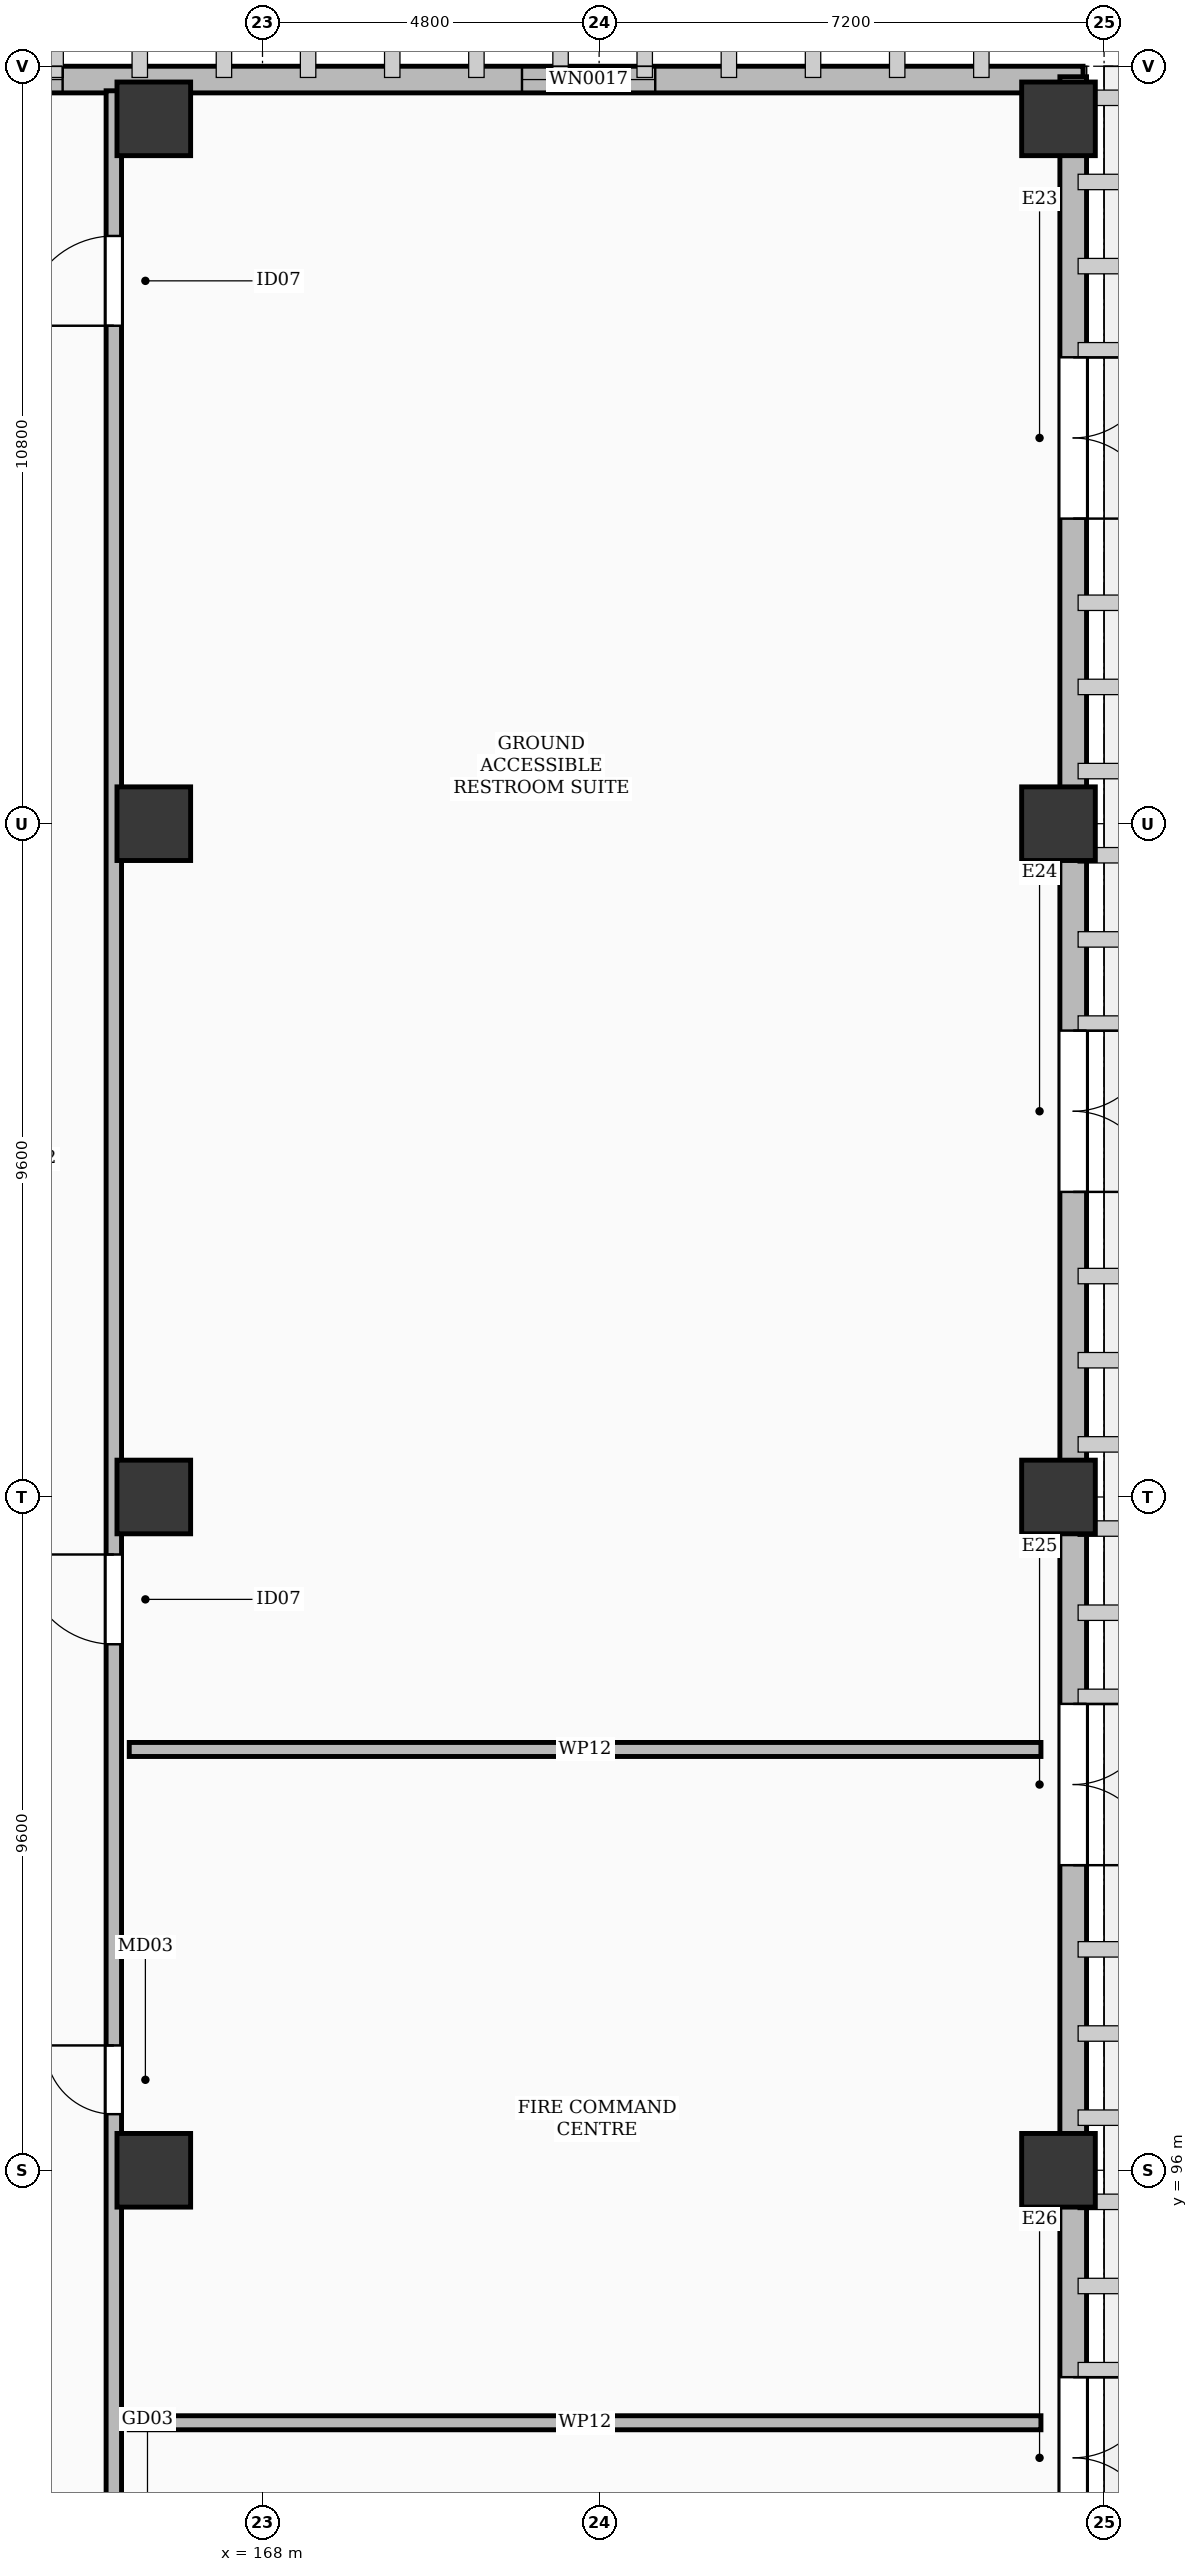
"""IFC4 building model, lengths in metres.
Left out: names, types, materials, properties, quantities, classifications, styles, units other than length and angle.
Written with IfcOpenShell. Run it as: python <this file> out.ifc"""

import sys

from ifc_helpers import new_model, si_unit, direction, frame, frame_2d, origin, origin_2d, place, context, subcontext, project, spatial, rectangle, extrude, element, fill, save


model = new_model("IFC4")
c1 = context("Model", 3, precision=1e-05, world=origin(), true_north=direction((0.0, 1.0)))
c2 = subcontext(c1, "Body", "Model", "MODEL_VIEW")
j1 = project(units=[si_unit("LENGTHUNIT", "METRE"), si_unit("PLANEANGLEUNIT", "RADIAN")], contexts=[c1])
p1 = place(None, origin())
s1 = spatial("IfcSite", under=j1, at=p1, CompositionType="ELEMENT")
p2 = place(p1, origin())
s2 = spatial("IfcBuilding", under=s1, at=p2, CompositionType="ELEMENT")
p3 = place(p2, origin())
s3 = spatial("IfcBuildingStorey", under=s2, at=p3, CompositionType="ELEMENT", Elevation=0.0)
for number, where, z_axis, x_axis in (
    (1, (166.45, 96.0, 0.0), (0.0, 0.0, 1.0), (1.0, 0.0, 0.0)),
    (2, (166.45, 105.6, 0.0), (0.0, 0.0, 1.0), (1.0, 0.0, 0.0)),
    (3, (166.45, 115.2, 0.0), (0.0, 0.0, 1.0), (1.0, 0.0, 0.0)),
    (4, (166.45, 125.25, 0.0), (0.0, 0.0, 1.0), (1.0, 0.0, 0.0)),
    (5, (179.35, 96.0, 0.0), (0.0, 0.0, 1.0), (1.0, 0.0, 0.0)),
    (6, (179.35, 105.6, 0.0), (0.0, 0.0, 1.0), (1.0, 0.0, 0.0)),
    (7, (179.35, 115.2, 0.0), (0.0, 0.0, 1.0), (1.0, 0.0, 0.0)),
    (8, (179.35, 125.25, 0.0), (0.0, 0.0, 1.0), (1.0, 0.0, 0.0)),
):
    element("IfcColumn", number, at=place(p3, frame(where, z_axis=z_axis, x_axis=x_axis)), inside=s3, PredefinedType="COLUMN", context=c2, shape_type="SweptSolid", body=[
        extrude(rectangle(XDim=1.05, YDim=1.05, at=origin_2d()), origin(), (0.0, 0.0, 1.0), 6.0),
    ])
p4 = place(p3, frame((148.9, 125.81, 0.0), z_axis=(0.0, 0.0, 1.0), x_axis=(1.0, 0.0, 0.0)))
e9 = element("IfcWall", 9, at=p4, inside=s3, PredefinedType="SOLIDWALL", context=c2, shape_type="SweptSolid", body=[
    extrude(rectangle(XDim=30.8, YDim=0.38, at=frame_2d((15.4, 0.0))), origin(), (0.0, 0.0, 1.0), 5.7),
])
p5 = place(p4, frame((4.2, 0.0, 0.85)))
e10 = element("IfcOpeningElement", 10, at=p5, cuts=e9, PredefinedType="OPENING", context=c2, shape_type="SweptSolid", body=[
    extrude(rectangle(XDim=1.9, YDim=2.9, at=frame_2d((0.95, 1.45))), frame((0.0, 0.202, 0.0), z_axis=(0.0, -1.0, 0.0), x_axis=(1.0, 0.0, 0.0)), (0.0, 0.0, 1.0), 0.404),
])
p6 = place(p4, frame((14.35, 0.0, 0.85)))
e11 = element("IfcOpeningElement", 11, at=p6, cuts=e9, PredefinedType="OPENING", context=c2, shape_type="SweptSolid", body=[
    extrude(rectangle(XDim=1.9, YDim=2.9, at=frame_2d((0.95, 1.45))), frame((0.0, 0.202, 0.0), z_axis=(0.0, -1.0, 0.0), x_axis=(1.0, 0.0, 0.0)), (0.0, 0.0, 1.0), 0.404),
])
p7 = place(p4, frame((22.8, 0.0, 0.85)))
e12 = element("IfcOpeningElement", 12, at=p7, cuts=e9, PredefinedType="OPENING", context=c2, shape_type="SweptSolid", body=[
    extrude(rectangle(XDim=1.9, YDim=2.9, at=frame_2d((0.95, 1.45))), frame((0.0, 0.202, 0.0), z_axis=(0.0, -1.0, 0.0), x_axis=(1.0, 0.0, 0.0)), (0.0, 0.0, 1.0), 0.404),
])
p8 = place(p3, frame((179.56, 125.85, 0.0), z_axis=(0.0, 0.0, 1.0), x_axis=(0.0, -1.0, 0.0)))
e13 = element("IfcWall", 13, at=p8, inside=s3, PredefinedType="SOLIDWALL", context=c2, shape_type="SweptSolid", body=[
    extrude(rectangle(XDim=125.7, YDim=0.38, at=frame_2d((62.85, 0.0))), origin(), (0.0, 0.0, 1.0), 4.692),
])
p9 = place(p8, frame((4.0, 0.0, 0.0)))
e14 = element("IfcOpeningElement", 14, at=p9, cuts=e13, PredefinedType="OPENING", context=c2, shape_type="SweptSolid", body=[
    extrude(rectangle(XDim=2.3, YDim=2.4, at=frame_2d((1.15, 1.2))), frame((0.0, 0.202, 0.0), z_axis=(0.0, -1.0, 0.0), x_axis=(1.0, 0.0, 0.0)), (0.0, 0.0, 1.0), 0.404),
])
p10 = place(p8, frame((13.6, 0.0, 0.0)))
e15 = element("IfcOpeningElement", 15, at=p10, cuts=e13, PredefinedType="OPENING", context=c2, shape_type="SweptSolid", body=[
    extrude(rectangle(XDim=2.3, YDim=2.4, at=frame_2d((1.15, 1.2))), frame((0.0, 0.202, 0.0), z_axis=(0.0, -1.0, 0.0), x_axis=(1.0, 0.0, 0.0)), (0.0, 0.0, 1.0), 0.404),
])
p11 = place(p8, frame((23.2, 0.0, 0.0)))
e16 = element("IfcOpeningElement", 16, at=p11, cuts=e13, PredefinedType="OPENING", context=c2, shape_type="SweptSolid", body=[
    extrude(rectangle(XDim=2.3, YDim=2.4, at=frame_2d((1.15, 1.2))), frame((0.0, 0.202, 0.0), z_axis=(0.0, -1.0, 0.0), x_axis=(1.0, 0.0, 0.0)), (0.0, 0.0, 1.0), 0.404),
])
p12 = place(p8, frame((32.8, 0.0, 0.0)))
e17 = element("IfcOpeningElement", 17, at=p12, cuts=e13, PredefinedType="OPENING", context=c2, shape_type="SweptSolid", body=[
    extrude(rectangle(XDim=2.3, YDim=2.4, at=frame_2d((1.15, 1.2))), frame((0.0, 0.202, 0.0), z_axis=(0.0, -1.0, 0.0), x_axis=(1.0, 0.0, 0.0)), (0.0, 0.0, 1.0), 0.404),
])
p13 = place(p8, frame((42.4, 0.0, 0.0)))
e18 = element("IfcOpeningElement", 18, at=p13, cuts=e13, PredefinedType="OPENING", context=c2, shape_type="SweptSolid", body=[
    extrude(rectangle(XDim=2.3, YDim=2.4, at=frame_2d((1.15, 1.2))), frame((0.0, 0.202, 0.0), z_axis=(0.0, -1.0, 0.0), x_axis=(1.0, 0.0, 0.0)), (0.0, 0.0, 1.0), 0.404),
])
p14 = place(p8, frame((52.0, 0.0, 0.0)))
e19 = element("IfcOpeningElement", 19, at=p14, cuts=e13, PredefinedType="OPENING", context=c2, shape_type="SweptSolid", body=[
    extrude(rectangle(XDim=2.3, YDim=2.4, at=frame_2d((1.15, 1.2))), frame((0.0, 0.202, 0.0), z_axis=(0.0, -1.0, 0.0), x_axis=(1.0, 0.0, 0.0)), (0.0, 0.0, 1.0), 0.404),
])
p15 = place(p8, frame((61.6, 0.0, 0.0)))
e20 = element("IfcOpeningElement", 20, at=p15, cuts=e13, PredefinedType="OPENING", context=c2, shape_type="SweptSolid", body=[
    extrude(rectangle(XDim=2.3, YDim=2.4, at=frame_2d((1.15, 1.2))), frame((0.0, 0.202, 0.0), z_axis=(0.0, -1.0, 0.0), x_axis=(1.0, 0.0, 0.0)), (0.0, 0.0, 1.0), 0.404),
])
p16 = place(p8, frame((71.2, 0.0, 0.0)))
e21 = element("IfcOpeningElement", 21, at=p16, cuts=e13, PredefinedType="OPENING", context=c2, shape_type="SweptSolid", body=[
    extrude(rectangle(XDim=2.3, YDim=2.4, at=frame_2d((1.15, 1.2))), frame((0.0, 0.202, 0.0), z_axis=(0.0, -1.0, 0.0), x_axis=(1.0, 0.0, 0.0)), (0.0, 0.0, 1.0), 0.404),
])
p17 = place(p8, frame((80.8, 0.0, 0.0)))
e22 = element("IfcOpeningElement", 22, at=p17, cuts=e13, PredefinedType="OPENING", context=c2, shape_type="SweptSolid", body=[
    extrude(rectangle(XDim=2.3, YDim=2.4, at=frame_2d((1.15, 1.2))), frame((0.0, 0.202, 0.0), z_axis=(0.0, -1.0, 0.0), x_axis=(1.0, 0.0, 0.0)), (0.0, 0.0, 1.0), 0.404),
])
p18 = place(p8, frame((90.4, 0.0, 0.0)))
e23 = element("IfcOpeningElement", 23, at=p18, cuts=e13, PredefinedType="OPENING", context=c2, shape_type="SweptSolid", body=[
    extrude(rectangle(XDim=2.3, YDim=2.4, at=frame_2d((1.15, 1.2))), frame((0.0, 0.202, 0.0), z_axis=(0.0, -1.0, 0.0), x_axis=(1.0, 0.0, 0.0)), (0.0, 0.0, 1.0), 0.404),
])
p19 = place(p8, frame((100.0, 0.0, 0.0)))
e24 = element("IfcOpeningElement", 24, at=p19, cuts=e13, PredefinedType="OPENING", context=c2, shape_type="SweptSolid", body=[
    extrude(rectangle(XDim=2.3, YDim=2.4, at=frame_2d((1.15, 1.2))), frame((0.0, 0.202, 0.0), z_axis=(0.0, -1.0, 0.0), x_axis=(1.0, 0.0, 0.0)), (0.0, 0.0, 1.0), 0.404),
])
p20 = place(p8, frame((109.6, 0.0, 0.0)))
e25 = element("IfcOpeningElement", 25, at=p20, cuts=e13, PredefinedType="OPENING", context=c2, shape_type="SweptSolid", body=[
    extrude(rectangle(XDim=2.3, YDim=2.4, at=frame_2d((1.15, 1.2))), frame((0.0, 0.202, 0.0), z_axis=(0.0, -1.0, 0.0), x_axis=(1.0, 0.0, 0.0)), (0.0, 0.0, 1.0), 0.404),
])
p21 = place(p8, frame((94.15, 0.0, 0.0)))
e26 = element("IfcOpeningElement", 26, at=p21, cuts=e13, PredefinedType="OPENING", context=c2, shape_type="SweptSolid", body=[
    extrude(rectangle(XDim=1.9, YDim=2.45, at=frame_2d((0.95, 1.225))), frame((0.0, 0.202, 0.0), z_axis=(0.0, -1.0, 0.0), x_axis=(1.0, 0.0, 0.0)), (0.0, 0.0, 1.0), 0.404),
])
p22 = place(p8, frame((113.35, 0.0, 0.0)))
e27 = element("IfcOpeningElement", 27, at=p22, cuts=e13, PredefinedType="OPENING", context=c2, shape_type="SweptSolid", body=[
    extrude(rectangle(XDim=1.9, YDim=2.45, at=frame_2d((0.95, 1.225))), frame((0.0, 0.202, 0.0), z_axis=(0.0, -1.0, 0.0), x_axis=(1.0, 0.0, 0.0)), (0.0, 0.0, 1.0), 0.404),
])
p23 = place(p3, frame((165.88, 65.4, 0.0), z_axis=(0.0, 0.0, 1.0), x_axis=(0.0, 1.0, 0.0)))
e28 = element("IfcWall", 28, at=p23, inside=s3, PredefinedType="PARTITIONING", context=c2, shape_type="SweptSolid", body=[
    extrude(rectangle(XDim=60.25, YDim=0.22, at=frame_2d((30.125, 0.0))), origin(), (0.0, 0.0, 1.0), 4.692),
])
p24 = place(p23, frame((2.75, 0.0, 0.0)))
e29 = element("IfcOpeningElement", 29, at=p24, cuts=e28, PredefinedType="OPENING", context=c2, shape_type="SweptSolid", body=[
    extrude(rectangle(XDim=1.5, YDim=2.3, at=frame_2d((0.75, 1.15))), frame((0.0, 0.122, 0.0), z_axis=(0.0, -1.0, 0.0), x_axis=(1.0, 0.0, 0.0)), (0.0, 0.0, 1.0), 0.244),
])
p25 = place(p23, frame((23.7, 0.0, 0.0)))
e30 = element("IfcOpeningElement", 30, at=p25, cuts=e28, PredefinedType="OPENING", context=c2, shape_type="SweptSolid", body=[
    extrude(rectangle(XDim=1.5, YDim=2.3, at=frame_2d((0.75, 1.15))), frame((0.0, 0.122, 0.0), z_axis=(0.0, -1.0, 0.0), x_axis=(1.0, 0.0, 0.0)), (0.0, 0.0, 1.0), 0.244),
])
p26 = place(p23, frame((31.4, 0.0, 0.0)))
e31 = element("IfcOpeningElement", 31, at=p26, cuts=e28, PredefinedType="OPENING", context=c2, shape_type="SweptSolid", body=[
    extrude(rectangle(XDim=0.98, YDim=2.15, at=frame_2d((0.49, 1.075))), frame((0.0, 0.122, 0.0), z_axis=(0.0, -1.0, 0.0), x_axis=(1.0, 0.0, 0.0)), (0.0, 0.0, 1.0), 0.244),
])
p27 = place(p23, frame((38.1, 0.0, 0.0)))
e32 = element("IfcOpeningElement", 32, at=p27, cuts=e28, PredefinedType="OPENING", context=c2, shape_type="SweptSolid", body=[
    extrude(rectangle(XDim=1.28, YDim=2.16, at=frame_2d((0.64, 1.08))), frame((0.0, 0.122, 0.0), z_axis=(0.0, -1.0, 0.0), x_axis=(1.0, 0.0, 0.0)), (0.0, 0.0, 1.0), 0.244),
])
p28 = place(p23, frame((56.9, 0.0, 0.0)))
e33 = element("IfcOpeningElement", 33, at=p28, cuts=e28, PredefinedType="OPENING", context=c2, shape_type="SweptSolid", body=[
    extrude(rectangle(XDim=1.28, YDim=2.16, at=frame_2d((0.64, 1.08))), frame((0.0, 0.122, 0.0), z_axis=(0.0, -1.0, 0.0), x_axis=(1.0, 0.0, 0.0)), (0.0, 0.0, 1.0), 0.244),
])
for number, where, z_axis, x_axis in (
    (34, (166.1, 92.4, 0.0), (0.0, 0.0, 1.0), (1.0, 0.0, 0.0)),
    (35, (166.1, 102.0, 0.0), (0.0, 0.0, 1.0), (1.0, 0.0, 0.0)),
):
    element("IfcWall", number, at=place(p3, frame(where, z_axis=z_axis, x_axis=x_axis)), inside=s3, PredefinedType="PARTITIONING", context=c2, shape_type="SweptSolid", body=[
        extrude(rectangle(XDim=13.0, YDim=0.2, at=frame_2d((6.5, 0.0))), origin(), (0.0, 0.0, 1.0), 4.692),
    ])
p29 = place(p6, origin())
e36 = element("IfcWindow", 36, at=p29, inside=s3, PartitioningType="SINGLE_PANEL", PredefinedType="WINDOW", context=c2, shape_type="SweptSolid", body=[
    extrude(rectangle(XDim=1.9, YDim=2.9, at=frame_2d((0.95, 1.45))), frame((0.0, 0.03, 0.0), z_axis=(0.0, -1.0, 0.0), x_axis=(1.0, 0.0, 0.0)), (0.0, 0.0, 1.0), 0.06),
])
fill(e11, e36)
p30 = place(p7, origin())
e37 = element("IfcWindow", 37, at=p30, inside=s3, PartitioningType="SINGLE_PANEL", PredefinedType="WINDOW", context=c2, shape_type="SweptSolid", body=[
    extrude(rectangle(XDim=1.9, YDim=2.9, at=frame_2d((0.95, 1.45))), frame((0.0, 0.03, 0.0), z_axis=(0.0, -1.0, 0.0), x_axis=(1.0, 0.0, 0.0)), (0.0, 0.0, 1.0), 0.06),
])
fill(e12, e37)
p31 = place(p9, origin())
e38 = element("IfcDoor", 38, at=p31, inside=s3, OperationType="DOUBLE_DOOR_SINGLE_SWING", PredefinedType="DOOR", context=c2, shape_type="SweptSolid", body=[
    extrude(rectangle(XDim=2.3, YDim=2.4, at=frame_2d((1.15, 1.2))), frame((0.0, 0.025, 0.0), z_axis=(0.0, -1.0, 0.0), x_axis=(1.0, 0.0, 0.0)), (0.0, 0.0, 1.0), 0.05),
])
fill(e14, e38)
p32 = place(p10, origin())
e39 = element("IfcDoor", 39, at=p32, inside=s3, OperationType="DOUBLE_DOOR_SINGLE_SWING", PredefinedType="DOOR", context=c2, shape_type="SweptSolid", body=[
    extrude(rectangle(XDim=2.3, YDim=2.4, at=frame_2d((1.15, 1.2))), frame((0.0, 0.025, 0.0), z_axis=(0.0, -1.0, 0.0), x_axis=(1.0, 0.0, 0.0)), (0.0, 0.0, 1.0), 0.05),
])
fill(e15, e39)
p33 = place(p11, origin())
e40 = element("IfcDoor", 40, at=p33, inside=s3, OperationType="DOUBLE_DOOR_SINGLE_SWING", PredefinedType="DOOR", context=c2, shape_type="SweptSolid", body=[
    extrude(rectangle(XDim=2.3, YDim=2.4, at=frame_2d((1.15, 1.2))), frame((0.0, 0.025, 0.0), z_axis=(0.0, -1.0, 0.0), x_axis=(1.0, 0.0, 0.0)), (0.0, 0.0, 1.0), 0.05),
])
fill(e16, e40)
p34 = place(p12, origin())
e41 = element("IfcDoor", 41, at=p34, inside=s3, OperationType="DOUBLE_DOOR_SINGLE_SWING", PredefinedType="DOOR", context=c2, shape_type="SweptSolid", body=[
    extrude(rectangle(XDim=2.3, YDim=2.4, at=frame_2d((1.15, 1.2))), frame((0.0, 0.025, 0.0), z_axis=(0.0, -1.0, 0.0), x_axis=(1.0, 0.0, 0.0)), (0.0, 0.0, 1.0), 0.05),
])
fill(e17, e41)
p35 = place(p26, origin())
e42 = element("IfcDoor", 42, at=p35, inside=s3, OperationType="SINGLE_SWING_RIGHT", PredefinedType="DOOR", context=c2, shape_type="SweptSolid", body=[
    extrude(rectangle(XDim=0.98, YDim=2.15, at=frame_2d((0.49, 1.075))), frame((0.0, 0.025, 0.0), z_axis=(0.0, -1.0, 0.0), x_axis=(1.0, 0.0, 0.0)), (0.0, 0.0, 1.0), 0.05),
])
fill(e31, e42)
p36 = place(p27, origin())
e43 = element("IfcDoor", 43, at=p36, inside=s3, OperationType="SINGLE_SWING_RIGHT", PredefinedType="DOOR", context=c2, shape_type="SweptSolid", body=[
    extrude(rectangle(XDim=1.28, YDim=2.16, at=frame_2d((0.64, 1.08))), frame((0.0, 0.025, 0.0), z_axis=(0.0, -1.0, 0.0), x_axis=(1.0, 0.0, 0.0)), (0.0, 0.0, 1.0), 0.05),
])
fill(e32, e43)
p37 = place(p28, origin())
e44 = element("IfcDoor", 44, at=p37, inside=s3, OperationType="SINGLE_SWING_LEFT", PredefinedType="DOOR", context=c2, shape_type="SweptSolid", body=[
    extrude(rectangle(XDim=1.28, YDim=2.16, at=frame_2d((0.64, 1.08))), frame((0.0, 0.025, 0.0), z_axis=(0.0, -1.0, 0.0), x_axis=(1.0, 0.0, 0.0)), (0.0, 0.0, 1.0), 0.05),
])
fill(e33, e44)
save(model, sys.argv[1])
